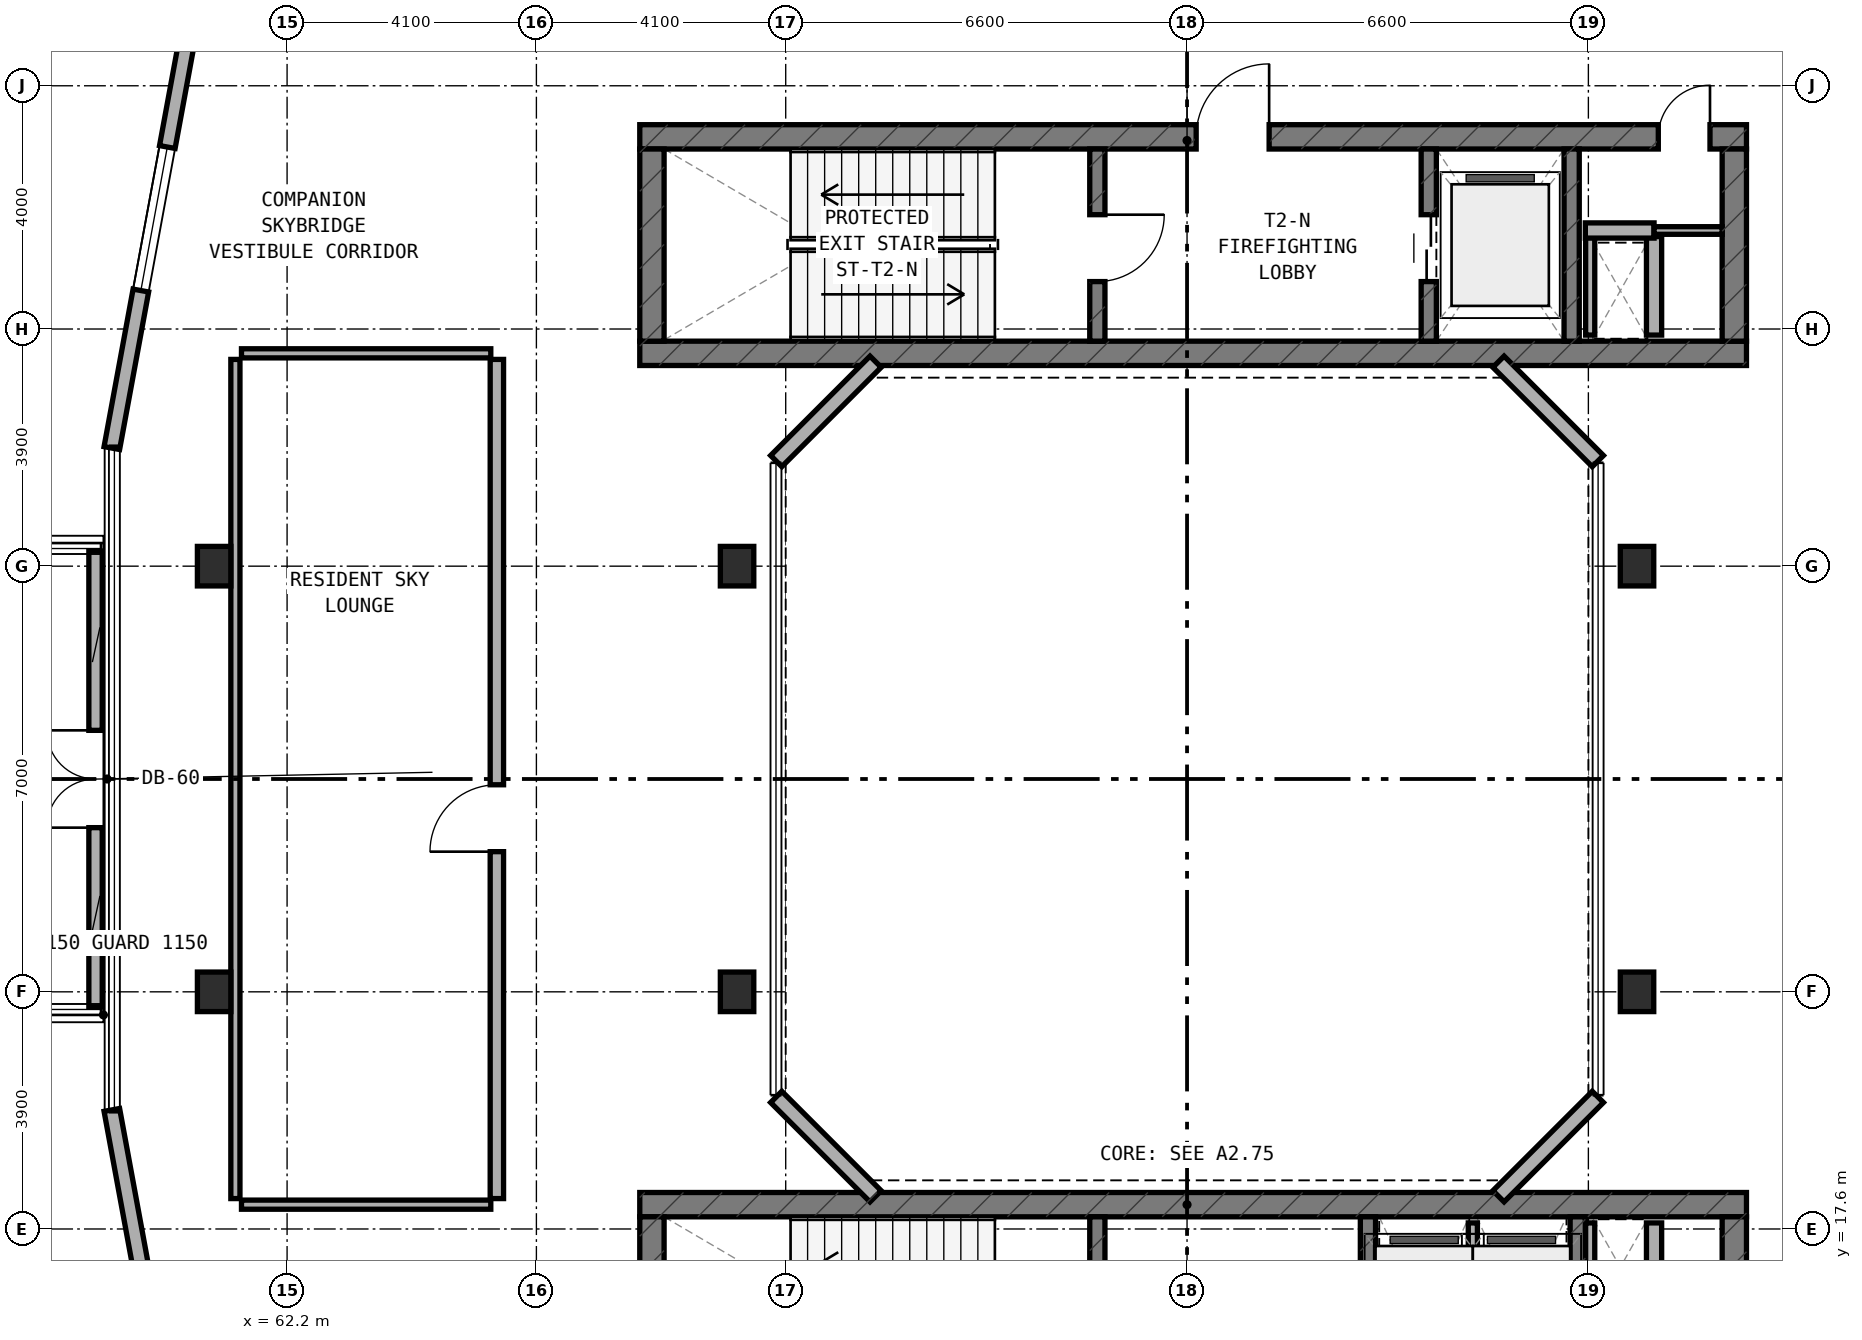
"""IFC4 building model, lengths in metres.
Left out: names, types, materials, properties, quantities, classifications, styles, units other than length and angle.
Written with IfcOpenShell. Run it as: python <this file> out.ifc"""

import sys

from ifc_helpers import new_model, si_unit, direction, frame, frame_2d, origin, origin_2d, place, context, subcontext, project, spatial, rectangle, extrude, element, fill, save


model = new_model("IFC4")
c1 = context("Model", 3, precision=1e-05, world=origin(), true_north=direction((0.0, 1.0)))
c2 = subcontext(c1, "Body", "Model", "MODEL_VIEW")
j1 = project(units=[si_unit("LENGTHUNIT", "METRE"), si_unit("PLANEANGLEUNIT", "RADIAN")], contexts=[c1])
p1 = place(None, origin())
s1 = spatial("IfcSite", under=j1, at=p1, CompositionType="ELEMENT")
p2 = place(p1, origin())
s2 = spatial("IfcBuilding", under=s1, at=p2, CompositionType="ELEMENT")
p3 = place(p2, frame((0.0, 0.0, 119.5)))
s3 = spatial("IfcBuildingStorey", under=s2, at=p3, CompositionType="ELEMENT", Elevation=119.5)
p4 = place(p3, frame((68.0, 32.0, 0.0), z_axis=(0.0, 0.0, 1.0), x_axis=(1.0, 0.0, 0.0)))
e1 = element("IfcWall", 1, at=p4, inside=s3, PredefinedType="SHEAR", context=c2, shape_type="SweptSolid", body=[
    extrude(rectangle(XDim=18.2, YDim=0.4, at=frame_2d((9.1, 0.0))), origin(), (0.0, 0.0, 1.0), 4.5),
])
p5 = place(p3, frame((68.0, 35.56, 0.0), z_axis=(0.0, 0.0, 1.0), x_axis=(1.0, 0.0, 0.0)))
e2 = element("IfcWall", 2, at=p5, inside=s3, PredefinedType="SHEAR", context=c2, shape_type="SweptSolid", body=[
    extrude(rectangle(XDim=18.2, YDim=0.4, at=frame_2d((9.1, 0.0))), origin(), (0.0, 0.0, 1.0), 4.5),
])
p6 = place(p5, frame((9.15, 0.0, 0.0)))
e3 = element("IfcOpeningElement", 3, at=p6, cuts=e2, PredefinedType="OPENING", context=c2, shape_type="SweptSolid", body=[
    extrude(rectangle(XDim=1.2, YDim=2.15, at=frame_2d((0.6, 1.075))), frame((0.0, 0.21, 0.0), z_axis=(0.0, -1.0, 0.0), x_axis=(1.0, 0.0, 0.0)), (0.0, 0.0, 1.0), 0.42),
])
p7 = place(p5, frame((16.75, 0.0, 0.0)))
e4 = element("IfcOpeningElement", 4, at=p7, cuts=e2, PredefinedType="OPENING", context=c2, shape_type="SweptSolid", body=[
    extrude(rectangle(XDim=0.85, YDim=2.1, at=frame_2d((0.425, 1.05))), frame((0.0, 0.21, 0.0), z_axis=(0.0, -1.0, 0.0), x_axis=(1.0, 0.0, 0.0)), (0.0, 0.0, 1.0), 0.42),
])
for number, where, z_axis, x_axis in (
    (5, (68.2, 32.2, 0.0), (0.0, 0.0, 1.0), (0.0, 1.0, 0.0)),
    (6, (86.0, 32.2, 0.0), (0.0, 0.0, 1.0), (0.0, 1.0, 0.0)),
):
    element("IfcWall", number, at=place(p3, frame(where, z_axis=z_axis, x_axis=x_axis)), inside=s3, PredefinedType="SHEAR", context=c2, shape_type="SweptSolid", body=[
        extrude(rectangle(XDim=3.16, YDim=0.4, at=frame_2d((1.58, 0.0))), origin(), (0.0, 0.0, 1.0), 4.5),
    ])
p8 = place(p3, frame((75.525, 32.2, 0.0), z_axis=(0.0, 0.0, 1.0), x_axis=(0.0, 1.0, 0.0)))
e7 = element("IfcWall", 7, at=p8, inside=s3, PredefinedType="STANDARD", context=c2, shape_type="SweptSolid", body=[
    extrude(rectangle(XDim=3.16, YDim=0.25, at=frame_2d((1.58, 0.0))), origin(), (0.0, 0.0, 1.0), 4.25),
])
p9 = place(p8, frame((0.98, 0.0, 0.0)))
e8 = element("IfcOpeningElement", 8, at=p9, cuts=e7, PredefinedType="OPENING", context=c2, shape_type="SweptSolid", body=[
    extrude(rectangle(XDim=1.1, YDim=2.15, at=frame_2d((0.55, 1.075))), frame((0.0, 0.135, 0.0), z_axis=(0.0, -1.0, 0.0), x_axis=(1.0, 0.0, 0.0)), (0.0, 0.0, 1.0), 0.27),
])
p10 = place(p3, frame((80.975, 32.2, 0.0), z_axis=(0.0, 0.0, 1.0), x_axis=(0.0, 1.0, 0.0)))
e9 = element("IfcWall", 9, at=p10, inside=s3, PredefinedType="STANDARD", context=c2, shape_type="SweptSolid", body=[
    extrude(rectangle(XDim=3.16, YDim=0.25, at=frame_2d((1.58, 0.0))), origin(), (0.0, 0.0, 1.0), 4.25),
])
p11 = place(p10, frame((0.98, 0.0, 0.0)))
e10 = element("IfcOpeningElement", 10, at=p11, cuts=e9, PredefinedType="OPENING", context=c2, shape_type="SweptSolid", body=[
    extrude(rectangle(XDim=1.1, YDim=2.15, at=frame_2d((0.55, 1.075))), frame((0.0, 0.135, 0.0), z_axis=(0.0, -1.0, 0.0), x_axis=(1.0, 0.0, 0.0)), (0.0, 0.0, 1.0), 0.27),
])
p12 = place(p3, frame((83.325, 32.2, 0.0), z_axis=(0.0, 0.0, 1.0), x_axis=(0.0, 1.0, 0.0)))
e11 = element("IfcWall", 11, at=p12, inside=s3, PredefinedType="STANDARD", context=c2, shape_type="SweptSolid", body=[
    extrude(rectangle(XDim=3.16, YDim=0.25, at=frame_2d((1.58, 0.0))), origin(), (0.0, 0.0, 1.0), 4.25),
])
p13 = place(p3, frame((68.0, 18.0, 0.0), z_axis=(0.0, 0.0, 1.0), x_axis=(1.0, 0.0, 0.0)))
e12 = element("IfcWall", 12, at=p13, inside=s3, PredefinedType="SHEAR", context=c2, shape_type="SweptSolid", body=[
    extrude(rectangle(XDim=18.2, YDim=0.4, at=frame_2d((9.1, 0.0))), origin(), (0.0, 0.0, 1.0), 4.5),
])
for number, where, z_axis, x_axis in (
    (13, (68.2, 14.64, 0.0), (0.0, 0.0, 1.0), (0.0, 1.0, 0.0)),
    (14, (86.0, 14.64, 0.0), (0.0, 0.0, 1.0), (0.0, 1.0, 0.0)),
):
    element("IfcWall", number, at=place(p3, frame(where, z_axis=z_axis, x_axis=x_axis)), inside=s3, PredefinedType="SHEAR", context=c2, shape_type="SweptSolid", body=[
        extrude(rectangle(XDim=3.16, YDim=0.4, at=frame_2d((1.58, 0.0))), origin(), (0.0, 0.0, 1.0), 4.5),
    ])
p14 = place(p3, frame((75.525, 14.64, 0.0), z_axis=(0.0, 0.0, 1.0), x_axis=(0.0, 1.0, 0.0)))
e15 = element("IfcWall", 15, at=p14, inside=s3, PredefinedType="STANDARD", context=c2, shape_type="SweptSolid", body=[
    extrude(rectangle(XDim=3.16, YDim=0.25, at=frame_2d((1.58, 0.0))), origin(), (0.0, 0.0, 1.0), 4.25),
])
p15 = place(p14, frame((0.98, 0.0, 0.0)))
e16 = element("IfcOpeningElement", 16, at=p15, cuts=e15, PredefinedType="OPENING", context=c2, shape_type="SweptSolid", body=[
    extrude(rectangle(XDim=1.1, YDim=2.15, at=frame_2d((0.55, 1.075))), frame((0.0, 0.135, 0.0), z_axis=(0.0, -1.0, 0.0), x_axis=(1.0, 0.0, 0.0)), (0.0, 0.0, 1.0), 0.27),
])
for number, where, z_axis, x_axis in (
    (17, (79.975, 14.64, 0.0), (0.0, 0.0, 1.0), (0.0, 1.0, 0.0)),
    (18, (83.425, 14.64, 0.0), (0.0, 0.0, 1.0), (0.0, 1.0, 0.0)),
):
    element("IfcWall", number, at=place(p3, frame(where, z_axis=z_axis, x_axis=x_axis)), inside=s3, PredefinedType="STANDARD", context=c2, shape_type="SweptSolid", body=[
        extrude(rectangle(XDim=3.16, YDim=0.25, at=frame_2d((1.58, 0.0))), origin(), (0.0, 0.0, 1.0), 4.25),
    ])
for number, where, z_axis, x_axis in (
    (19, (61.0, 21.5, 0.0), (0.0, 0.0, 1.0), (1.0, 0.0, 0.0)),
    (20, (61.0, 28.5, 0.0), (0.0, 0.0, 1.0), (1.0, 0.0, 0.0)),
    (21, (69.6, 21.5, 0.0), (0.0, 0.0, 1.0), (1.0, 0.0, 0.0)),
    (22, (69.6, 28.5, 0.0), (0.0, 0.0, 1.0), (1.0, 0.0, 0.0)),
    (23, (84.4, 21.5, 0.0), (0.0, 0.0, 1.0), (1.0, 0.0, 0.0)),
    (24, (84.4, 28.5, 0.0), (0.0, 0.0, 1.0), (1.0, 0.0, 0.0)),
):
    element("IfcColumn", number, at=place(p3, frame(where, z_axis=z_axis, x_axis=x_axis)), inside=s3, PredefinedType="COLUMN", context=c2, shape_type="SweptSolid", body=[
        extrude(rectangle(XDim=0.55, YDim=0.65, at=origin_2d()), origin(), (0.0, 0.0, 1.0), 4.5),
    ])
p16 = place(p3, frame((60.929, 39.184, 0.0), z_axis=(0.0, 0.0, 1.0), x_axis=(-0.181209963057, -0.983444431215, 0.0)))
e25 = element("IfcWall", 25, at=p16, inside=s3, PredefinedType="STANDARD", context=c2, shape_type="SweptSolid", body=[
    extrude(rectangle(XDim=8.889, YDim=0.26, at=frame_2d((4.445, 0.0))), origin(), (0.0, 0.0, 1.0), 4.25),
])
p17 = place(p16, frame((3.855, 0.0, 0.8)))
e26 = element("IfcOpeningElement", 26, at=p17, cuts=e25, PredefinedType="OPENING", context=c2, shape_type="SweptSolid", body=[
    extrude(rectangle(XDim=2.4, YDim=1.6, at=frame_2d((1.2, 0.8))), frame((0.0, 0.14, 0.0), z_axis=(0.0, -1.0, 0.0), x_axis=(1.0, 0.0, 0.0)), (0.0, 0.0, 1.0), 0.28),
])
p18 = place(p3, frame((59.318, 19.558, 0.0), z_axis=(0.0, 0.0, 1.0), x_axis=(0.181209963057, -0.983444431215, 0.0)))
e27 = element("IfcWall", 27, at=p18, inside=s3, PredefinedType="STANDARD", context=c2, shape_type="SweptSolid", body=[
    extrude(rectangle(XDim=8.889, YDim=0.26, at=frame_2d((4.445, 0.0))), origin(), (0.0, 0.0, 1.0), 4.25),
])
p19 = place(p18, frame((2.634, 0.0, 0.8)))
e28 = element("IfcOpeningElement", 28, at=p19, cuts=e27, PredefinedType="OPENING", context=c2, shape_type="SweptSolid", body=[
    extrude(rectangle(XDim=2.4, YDim=1.6, at=frame_2d((1.2, 0.8))), frame((0.0, 0.14, 0.0), z_axis=(0.0, -1.0, 0.0), x_axis=(1.0, 0.0, 0.0)), (0.0, 0.0, 1.0), 0.28),
])
for number, where, z_axis, x_axis in (
    (29, (82.122, 18.138, 0.0), (0.0, 0.0, 1.0), (0.707, 0.707, 0.0)),
    (30, (83.756, 30.228, 0.0), (0.0, 0.0, 1.0), (-0.707, 0.707, 0.0)),
    (31, (71.878, 31.862, 0.0), (0.0, 0.0, 1.0), (-0.707, -0.707, 0.0)),
    (32, (70.244, 19.772, 0.0), (0.0, 0.0, 1.0), (0.707, -0.707, 0.0)),
):
    element("IfcWall", number, at=place(p3, frame(where, z_axis=z_axis, x_axis=x_axis)), inside=s3, PredefinedType="STANDARD", context=c2, shape_type="SweptSolid", body=[
        extrude(rectangle(XDim=2.311, YDim=0.26, at=frame_2d((1.155, 0.0))), origin(), (0.0, 0.0, 1.0), 4.25),
    ])
p20 = place(p3, frame((83.63, 32.3, 0.0), z_axis=(0.0, 0.0, 1.0), x_axis=(0.0, 1.0, 0.0)))
e33 = element("IfcWall", 33, at=p20, inside=s3, PredefinedType="PARTITIONING", context=c2, shape_type="SweptSolid", body=[
    extrude(rectangle(XDim=1.62, YDim=0.15, at=frame_2d((0.81, 0.0))), origin(), (0.0, 0.0, 1.0), 3.825),
])
p21 = place(p3, frame((84.68, 32.3, 0.0), z_axis=(0.0, 0.0, 1.0), x_axis=(0.0, 1.0, 0.0)))
e34 = element("IfcWall", 34, at=p21, inside=s3, PredefinedType="SOLIDWALL", context=c2, shape_type="SweptSolid", body=[
    extrude(rectangle(XDim=1.62, YDim=0.25, at=frame_2d((0.81, 0.0))), origin(), (0.0, 0.0, 1.0), 4.22),
])
p22 = place(p3, frame((83.55, 34.02, 0.0), z_axis=(0.0, 0.0, 1.0), x_axis=(1.0, 0.0, 0.0)))
e35 = element("IfcWall", 35, at=p22, inside=s3, PredefinedType="SOLIDWALL", context=c2, shape_type="SweptSolid", body=[
    extrude(rectangle(XDim=1.13, YDim=0.25, at=frame_2d((0.565, 0.0))), origin(), (0.0, 0.0, 1.0), 4.22),
])
p23 = place(p3, frame((84.68, 34.02, 0.0), z_axis=(0.0, 0.0, 1.0), x_axis=(1.0, 0.0, 0.0)))
e36 = element("IfcWall", 36, at=p23, inside=s3, PredefinedType="PARTITIONING", context=c2, shape_type="SweptSolid", body=[
    extrude(rectangle(XDim=1.12, YDim=0.125, at=frame_2d((0.56, 0.0))), origin(), (0.0, 0.0, 1.0), 4.22),
])
p24 = place(p3, frame((83.63, 16.08, 0.0), z_axis=(0.0, 0.0, 1.0), x_axis=(0.0, 1.0, 0.0)))
e37 = element("IfcWall", 37, at=p24, inside=s3, PredefinedType="PARTITIONING", context=c2, shape_type="SweptSolid", body=[
    extrude(rectangle(XDim=1.62, YDim=0.15, at=frame_2d((0.81, 0.0))), origin(), (0.0, 0.0, 1.0), 3.825),
])
p25 = place(p3, frame((84.68, 16.08, 0.0), z_axis=(0.0, 0.0, 1.0), x_axis=(0.0, 1.0, 0.0)))
e38 = element("IfcWall", 38, at=p25, inside=s3, PredefinedType="SOLIDWALL", context=c2, shape_type="SweptSolid", body=[
    extrude(rectangle(XDim=1.62, YDim=0.25, at=frame_2d((0.81, 0.0))), origin(), (0.0, 0.0, 1.0), 4.22),
])
p26 = place(p3, frame((81.7, 14.74, 0.0), z_axis=(0.0, 0.0, 1.0), x_axis=(0.0, 1.0, 0.0)))
e39 = element("IfcWall", 39, at=p26, inside=s3, PredefinedType="PARTITIONING", context=c2, shape_type="SweptSolid", body=[
    extrude(rectangle(XDim=2.96, YDim=0.15, at=frame_2d((1.48, 0.0))), origin(), (0.0, 0.0, 1.0), 4.22),
])
p27 = place(p3, frame((59.05, 21.25, 0.0), z_axis=(0.0, 0.0, 1.0), x_axis=(0.0, 1.0, 0.0)))
e40 = element("IfcWall", 40, at=p27, inside=s3, PredefinedType="SOLIDWALL", context=c2, shape_type="SweptSolid", body=[
    extrude(rectangle(XDim=7.5, YDim=0.22, at=frame_2d((3.75, 0.0))), origin(), (0.0, 0.0, 1.0), 3.795),
])
p28 = place(p27, frame((2.95, 0.0, 0.0)))
e41 = element("IfcOpeningElement", 41, at=p28, cuts=e40, PredefinedType="OPENING", context=c2, shape_type="SweptSolid", body=[
    extrude(rectangle(XDim=1.6, YDim=2.15, at=frame_2d((0.8, 1.075))), frame((0.0, 0.12, 0.0), z_axis=(0.0, -1.0, 0.0), x_axis=(1.0, 0.0, 0.0)), (0.0, 0.0, 1.0), 0.24),
])
p29 = place(p3, frame((61.35, 18.1, 0.0), z_axis=(0.0, 0.0, 1.0), x_axis=(0.0, 1.0, 0.0)))
e42 = element("IfcWall", 42, at=p29, inside=s3, PredefinedType="PARTITIONING", context=c2, shape_type="SweptSolid", body=[
    extrude(rectangle(XDim=13.8, YDim=0.15, at=frame_2d((6.9, 0.0))), origin(), (0.0, 0.0, 1.0), 3.825),
])
for number, where, z_axis, x_axis in (
    (43, (61.45, 18.0, 0.0), (0.0, 0.0, 1.0), (1.0, 0.0, 0.0)),
    (44, (61.45, 32.0, 0.0), (0.0, 0.0, 1.0), (1.0, 0.0, 0.0)),
):
    element("IfcWall", number, at=place(p3, frame(where, z_axis=z_axis, x_axis=x_axis)), inside=s3, PredefinedType="PARTITIONING", context=c2, shape_type="SweptSolid", body=[
        extrude(rectangle(XDim=4.1, YDim=0.15, at=frame_2d((2.05, 0.0))), origin(), (0.0, 0.0, 1.0), 3.945),
    ])
p30 = place(p3, frame((65.65, 18.1, 0.0), z_axis=(0.0, 0.0, 1.0), x_axis=(0.0, 1.0, 0.0)))
e45 = element("IfcWall", 45, at=p30, inside=s3, PredefinedType="SOLIDWALL", context=c2, shape_type="SweptSolid", body=[
    extrude(rectangle(XDim=13.8, YDim=0.22, at=frame_2d((6.9, 0.0))), origin(), (0.0, 0.0, 1.0), 3.825),
])
p31 = place(p30, frame((5.705, 0.0, 0.0)))
e46 = element("IfcOpeningElement", 46, at=p31, cuts=e45, PredefinedType="OPENING", context=c2, shape_type="SweptSolid", body=[
    extrude(rectangle(XDim=1.1, YDim=2.1, at=frame_2d((0.55, 1.05))), frame((0.0, 0.12, 0.0), z_axis=(0.0, -1.0, 0.0), x_axis=(1.0, 0.0, 0.0)), (0.0, 0.0, 1.0), 0.24),
])
p32 = place(p17, origin())
e47 = element("IfcWindow", 47, at=p32, inside=s3, PartitioningType="SINGLE_PANEL", PredefinedType="WINDOW", context=c2, shape_type="SweptSolid", body=[
    extrude(rectangle(XDim=2.4, YDim=1.6, at=frame_2d((1.2, 0.8))), frame((0.0, 0.03, 0.0), z_axis=(0.0, -1.0, 0.0), x_axis=(1.0, 0.0, 0.0)), (0.0, 0.0, 1.0), 0.06),
])
fill(e26, e47)
p33 = place(p9, frame((1.1, 0.0, 0.0), z_axis=(0.0, 0.0, 1.0), x_axis=(-1.0, 0.0, 0.0)))
e48 = element("IfcDoor", 48, at=p33, inside=s3, OperationType="SINGLE_SWING_LEFT", PredefinedType="DOOR", context=c2, shape_type="SweptSolid", body=[
    extrude(rectangle(XDim=1.1, YDim=2.15, at=frame_2d((0.55, 1.075))), frame((0.0, 0.025, 0.0), z_axis=(0.0, -1.0, 0.0), x_axis=(1.0, 0.0, 0.0)), (0.0, 0.0, 1.0), 0.05),
])
fill(e8, e48)
p34 = place(p6, origin())
e49 = element("IfcDoor", 49, at=p34, inside=s3, OperationType="SINGLE_SWING_RIGHT", PredefinedType="DOOR", context=c2, shape_type="SweptSolid", body=[
    extrude(rectangle(XDim=1.2, YDim=2.15, at=frame_2d((0.6, 1.075))), frame((0.0, 0.025, 0.0), z_axis=(0.0, -1.0, 0.0), x_axis=(1.0, 0.0, 0.0)), (0.0, 0.0, 1.0), 0.05),
])
fill(e3, e49)
p35 = place(p11, origin())
e50 = element("IfcDoor", 50, at=p35, inside=s3, OperationType="DOUBLE_DOOR_SLIDING", PredefinedType="DOOR", context=c2, shape_type="SweptSolid", body=[
    extrude(rectangle(XDim=1.1, YDim=2.15, at=frame_2d((0.55, 1.075))), frame((0.0, 0.025, 0.0), z_axis=(0.0, -1.0, 0.0), x_axis=(1.0, 0.0, 0.0)), (0.0, 0.0, 1.0), 0.05),
])
fill(e10, e50)
p36 = place(p7, origin())
e51 = element("IfcDoor", 51, at=p36, inside=s3, OperationType="SINGLE_SWING_RIGHT", PredefinedType="DOOR", context=c2, shape_type="SweptSolid", body=[
    extrude(rectangle(XDim=0.85, YDim=2.1, at=frame_2d((0.425, 1.05))), frame((0.0, 0.025, 0.0), z_axis=(0.0, -1.0, 0.0), x_axis=(1.0, 0.0, 0.0)), (0.0, 0.0, 1.0), 0.05),
])
fill(e4, e51)
p37 = place(p28, origin())
e52 = element("IfcDoor", 52, at=p37, inside=s3, OperationType="DOUBLE_DOOR_SINGLE_SWING", PredefinedType="DOOR", context=c2, shape_type="SweptSolid", body=[
    extrude(rectangle(XDim=1.6, YDim=2.15, at=frame_2d((0.8, 1.075))), frame((0.0, 0.025, 0.0), z_axis=(0.0, -1.0, 0.0), x_axis=(1.0, 0.0, 0.0)), (0.0, 0.0, 1.0), 0.05),
])
fill(e41, e52)
p38 = place(p31, origin())
e53 = element("IfcDoor", 53, at=p38, inside=s3, OperationType="SINGLE_SWING_LEFT", PredefinedType="DOOR", context=c2, shape_type="SweptSolid", body=[
    extrude(rectangle(XDim=1.1, YDim=2.1, at=frame_2d((0.55, 1.05))), frame((0.0, 0.025, 0.0), z_axis=(0.0, -1.0, 0.0), x_axis=(1.0, 0.0, 0.0)), (0.0, 0.0, 1.0), 0.05),
])
fill(e46, e53)
save(model, sys.argv[1])
